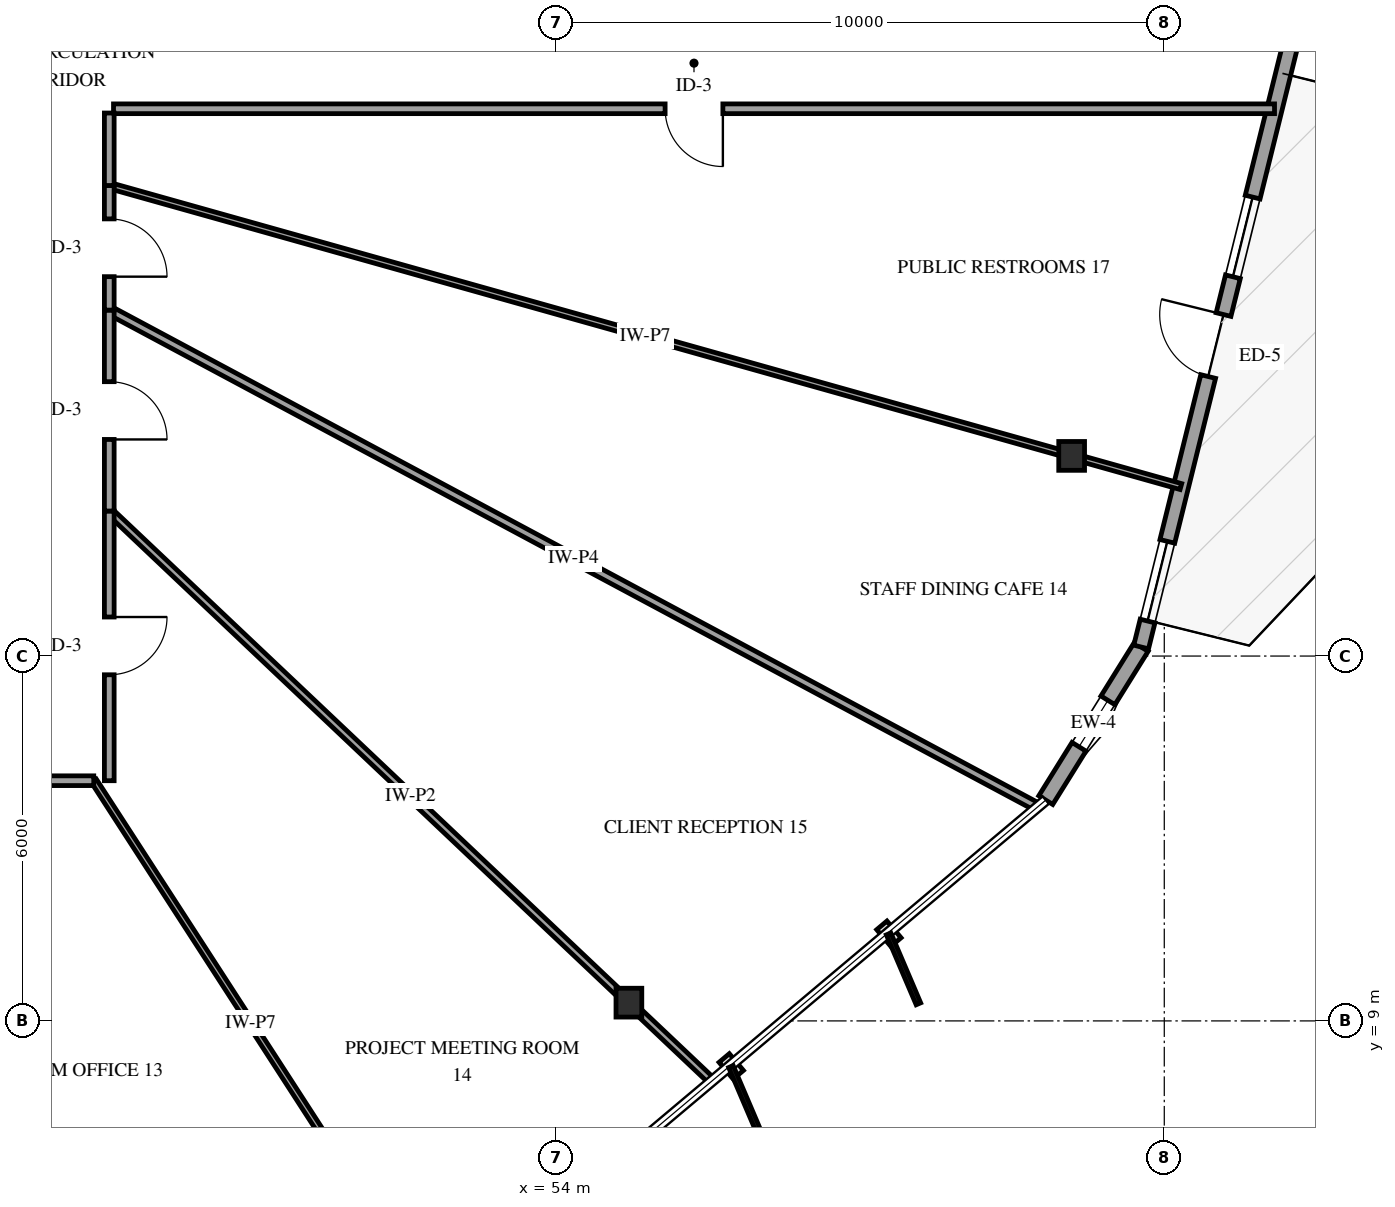
"""IFC4 building model, lengths in metres.
Left out: names, types, materials, properties, quantities, classifications, styles, units other than length and angle.
Written with IfcOpenShell. Run it as: python <this file> out.ifc"""

import sys

from ifc_helpers import new_model, si_unit, direction, frame, frame_2d, origin, origin_2d, place, context, subcontext, project, spatial, rectangle, i_section, extrude, element, fill, save


model = new_model("IFC4")
c1 = context("Model", 3, precision=1e-05, world=origin(), true_north=direction((0.0, 1.0)))
c2 = subcontext(c1, "Body", "Model", "MODEL_VIEW")
j1 = project(units=[si_unit("LENGTHUNIT", "METRE"), si_unit("PLANEANGLEUNIT", "RADIAN")], contexts=[c1])
p1 = place(None, origin())
s1 = spatial("IfcSite", under=j1, at=p1, CompositionType="ELEMENT")
p2 = place(p1, origin())
s2 = spatial("IfcBuilding", under=s1, at=p2, CompositionType="ELEMENT")
p3 = place(p2, frame((0.0, 0.0, 42.6)))
s3 = spatial("IfcBuildingStorey", under=s2, at=p3, CompositionType="ELEMENT", Elevation=42.6)
for number, where, z_axis, x_axis in (
    (1, (55.196, 9.3, 0.0), (0.0, 0.0, 1.0), (1.0, 0.0, 0.0)),
    (2, (62.477, 18.292, 0.0), (0.0, 0.0, 1.0), (1.0, 0.0, 0.0)),
):
    element("IfcColumn", number, at=place(p3, frame(where, z_axis=z_axis, x_axis=x_axis)), inside=s3, PredefinedType="COLUMN", context=c2, shape_type="SweptSolid", body=[
        extrude(i_section(OverallWidth=0.424, OverallDepth=0.474, WebThickness=0.048, FlangeThickness=0.077, FilletRadius=0.038, at=origin_2d()), origin(), (0.0, 0.0, 1.0), 4.0),
    ])
p4 = place(p3, frame((62.051, 12.631, 0.0), z_axis=(0.0, 0.0, 1.0), x_axis=(0.528777761123, 0.848760319137, 0.0)))
e3 = element("IfcWall", 3, at=p4, inside=s3, PredefinedType="SOLIDWALL", context=c2, shape_type="SweptSolid", body=[
    extrude(rectangle(XDim=2.967, YDim=0.27, at=frame_2d((1.483, 0.0))), origin(), (0.0, 0.0, 1.0), 3.079),
])
p5 = place(p4, frame((1.033, 0.0, 0.75)))
e4 = element("IfcOpeningElement", 4, at=p5, cuts=e3, PredefinedType="OPENING", context=c2, shape_type="SweptSolid", body=[
    extrude(rectangle(XDim=0.9, YDim=1.5, at=frame_2d((0.45, 0.75))), frame((0.0, 0.145, 0.0), z_axis=(0.0, -1.0, 0.0), x_axis=(1.0, 0.0, 0.0)), (0.0, 0.0, 1.0), 0.29),
])
p6 = place(p3, frame((63.62, 15.149, 0.0), z_axis=(0.0, 0.0, 1.0), x_axis=(0.2405572261, 0.970634957629, 0.0)))
e5 = element("IfcWall", 5, at=p6, inside=s3, PredefinedType="SOLIDWALL", context=c2, shape_type="SweptSolid", body=[
    extrude(rectangle(XDim=10.165, YDim=0.25, at=frame_2d((5.083, 0.0))), origin(), (0.0, 0.0, 1.0), 3.079),
])
p7 = place(p6, frame((4.583, 0.0, 0.0)))
e6 = element("IfcOpeningElement", 6, at=p7, cuts=e5, PredefinedType="OPENING", context=c2, shape_type="SweptSolid", body=[
    extrude(rectangle(XDim=1.05, YDim=2.15, at=frame_2d((0.525, 1.075))), frame((0.0, 0.135, 0.0), z_axis=(0.0, -1.0, 0.0), x_axis=(1.0, 0.0, 0.0)), (0.0, 0.0, 1.0), 0.27),
])
p8 = place(p6, frame((0.44, 0.0, 0.72)))
e7 = element("IfcOpeningElement", 7, at=p8, cuts=e5, PredefinedType="OPENING", context=c2, shape_type="SweptSolid", body=[
    extrude(rectangle(XDim=1.35, YDim=1.65, at=frame_2d((0.675, 0.825))), frame((0.0, 0.135, 0.0), z_axis=(0.0, -1.0, 0.0), x_axis=(1.0, 0.0, 0.0)), (0.0, 0.0, 1.0), 0.27),
])
p9 = place(p6, frame((6.273, 0.0, 0.72)))
e8 = element("IfcOpeningElement", 8, at=p9, cuts=e5, PredefinedType="OPENING", context=c2, shape_type="SweptSolid", body=[
    extrude(rectangle(XDim=1.35, YDim=1.65, at=frame_2d((0.675, 0.825))), frame((0.0, 0.135, 0.0), z_axis=(0.0, -1.0, 0.0), x_axis=(1.0, 0.0, 0.0)), (0.0, 0.0, 1.0), 0.27),
])
p10 = place(p3, frame((65.813, 24.0, 0.0), z_axis=(0.0, 0.0, 1.0), x_axis=(-1.0, 0.0, 0.0)))
e9 = element("IfcWall", 9, at=p10, inside=s3, PredefinedType="PARTITIONING", context=c2, shape_type="SweptSolid", body=[
    extrude(rectangle(XDim=19.093, YDim=0.16, at=frame_2d((9.546, 0.0))), origin(), (0.0, 0.0, 1.0), 3.7),
])
p11 = place(p10, frame((9.072, 0.0, 0.0)))
e10 = element("IfcOpeningElement", 10, at=p11, cuts=e9, PredefinedType="OPENING", context=c2, shape_type="SweptSolid", body=[
    extrude(rectangle(XDim=0.95, YDim=2.15, at=frame_2d((0.475, 1.075))), frame((0.0, 0.09, 0.0), z_axis=(0.0, -1.0, 0.0), x_axis=(1.0, 0.0, 0.0)), (0.0, 0.0, 1.0), 0.18),
])
p12 = place(p3, frame((46.65, 22.738, 0.0), z_axis=(0.0, 0.0, 1.0), x_axis=(0.962729980638, -0.270464386531, 0.0)))
e11 = element("IfcWall", 11, at=p12, inside=s3, PredefinedType="PARTITIONING", context=c2, shape_type="SweptSolid", body=[
    extrude(rectangle(XDim=18.305, YDim=0.1, at=frame_2d((9.153, 0.0))), origin(), (0.0, 0.0, 1.0), 2.995),
])
p13 = place(p3, frame((46.65, 20.689, 0.0), z_axis=(0.0, 0.0, 1.0), x_axis=(0.881597742857, -0.472001504012, 0.0)))
e12 = element("IfcWall", 12, at=p13, inside=s3, PredefinedType="PARTITIONING", context=c2, shape_type="SweptSolid", body=[
    extrude(rectangle(XDim=17.315, YDim=0.14, at=frame_2d((8.658, 0.0))), origin(), (0.0, 0.0, 1.0), 3.078),
])
p14 = place(p3, frame((46.65, 17.385, 0.0), z_axis=(0.0, 0.0, 1.0), x_axis=(0.726449099084, -0.68722027505, 0.0)))
e13 = element("IfcWall", 13, at=p14, inside=s3, PredefinedType="PARTITIONING", context=c2, shape_type="SweptSolid", body=[
    extrude(rectangle(XDim=13.642, YDim=0.12, at=frame_2d((6.821, 0.0))), origin(), (0.0, 0.0, 1.0), 2.995),
])
p15 = place(p3, frame((46.395, 12.95, 0.0), z_axis=(0.0, 0.0, 1.0), x_axis=(0.543178785991, -0.839617059408, 0.0)))
e14 = element("IfcWall", 14, at=p15, inside=s3, PredefinedType="PARTITIONING", context=c2, shape_type="SweptSolid", body=[
    extrude(rectangle(XDim=9.496, YDim=0.1, at=frame_2d((4.748, 0.0))), origin(), (0.0, 0.0, 1.0), 3.078),
])
p16 = place(p3, frame((46.65, 17.385, 0.0), z_axis=(0.0, 0.0, 1.0), x_axis=(0.0, -1.0, 0.0)))
e15 = element("IfcWall", 15, at=p16, inside=s3, PredefinedType="PARTITIONING", context=c2, shape_type="SweptSolid", body=[
    extrude(rectangle(XDim=4.435, YDim=0.16, at=frame_2d((2.218, 0.0))), origin(), (0.0, 0.0, 1.0), 3.7),
])
p17 = place(p16, frame((1.743, 0.0, 0.0)))
e16 = element("IfcOpeningElement", 16, at=p17, cuts=e15, PredefinedType="OPENING", context=c2, shape_type="SweptSolid", body=[
    extrude(rectangle(XDim=0.95, YDim=2.15, at=frame_2d((0.475, 1.075))), frame((0.0, 0.09, 0.0), z_axis=(0.0, -1.0, 0.0), x_axis=(1.0, 0.0, 0.0)), (0.0, 0.0, 1.0), 0.18),
])
p18 = place(p3, frame((46.395, 12.95, 0.0), z_axis=(0.0, 0.0, 1.0), x_axis=(-1.0, 0.0, 0.0)))
e17 = element("IfcWall", 17, at=p18, inside=s3, PredefinedType="PARTITIONING", context=c2, shape_type="SweptSolid", body=[
    extrude(rectangle(XDim=4.301, YDim=0.16, at=frame_2d((2.15, 0.0))), origin(), (0.0, 0.0, 1.0), 3.7),
])
p19 = place(p18, frame((1.676, 0.0, 0.0)))
e18 = element("IfcOpeningElement", 18, at=p19, cuts=e17, PredefinedType="OPENING", context=c2, shape_type="SweptSolid", body=[
    extrude(rectangle(XDim=0.95, YDim=2.15, at=frame_2d((0.475, 1.075))), frame((0.0, 0.09, 0.0), z_axis=(0.0, -1.0, 0.0), x_axis=(1.0, 0.0, 0.0)), (0.0, 0.0, 1.0), 0.18),
])
p20 = place(p3, frame((46.65, 20.689, 0.0), z_axis=(0.0, 0.0, 1.0), x_axis=(0.0, -1.0, 0.0)))
e19 = element("IfcWall", 19, at=p20, inside=s3, PredefinedType="PARTITIONING", context=c2, shape_type="SweptSolid", body=[
    extrude(rectangle(XDim=3.304, YDim=0.16, at=frame_2d((1.652, 0.0))), origin(), (0.0, 0.0, 1.0), 3.7),
])
p21 = place(p20, frame((1.177, 0.0, 0.0)))
e20 = element("IfcOpeningElement", 20, at=p21, cuts=e19, PredefinedType="OPENING", context=c2, shape_type="SweptSolid", body=[
    extrude(rectangle(XDim=0.95, YDim=2.15, at=frame_2d((0.475, 1.075))), frame((0.0, 0.09, 0.0), z_axis=(0.0, -1.0, 0.0), x_axis=(1.0, 0.0, 0.0)), (0.0, 0.0, 1.0), 0.18),
])
p22 = place(p3, frame((46.65, 22.738, 0.0), z_axis=(0.0, 0.0, 1.0), x_axis=(0.0, -1.0, 0.0)))
e21 = element("IfcWall", 21, at=p22, inside=s3, PredefinedType="PARTITIONING", context=c2, shape_type="SweptSolid", body=[
    extrude(rectangle(XDim=2.049, YDim=0.16, at=frame_2d((1.024, 0.0))), origin(), (0.0, 0.0, 1.0), 3.7),
])
p23 = place(p22, frame((0.549, 0.0, 0.0)))
e22 = element("IfcOpeningElement", 22, at=p23, cuts=e21, PredefinedType="OPENING", context=c2, shape_type="SweptSolid", body=[
    extrude(rectangle(XDim=0.95, YDim=2.15, at=frame_2d((0.475, 1.075))), frame((0.0, 0.09, 0.0), z_axis=(0.0, -1.0, 0.0), x_axis=(1.0, 0.0, 0.0)), (0.0, 0.0, 1.0), 0.18),
])
p24 = place(p3, frame((46.65, 23.93, 0.0), z_axis=(0.0, 0.0, 1.0), x_axis=(0.0, -1.0, 0.0)))
e23 = element("IfcWall", 23, at=p24, inside=s3, PredefinedType="PARTITIONING", context=c2, shape_type="SweptSolid", body=[
    extrude(rectangle(XDim=1.192, YDim=0.16, at=frame_2d((0.596, 0.0))), origin(), (0.0, 0.0, 1.0), 3.7),
])
p25 = place(p5, origin())
e24 = element("IfcWindow", 24, at=p25, inside=s3, PartitioningType="SINGLE_PANEL", PredefinedType="WINDOW", context=c2, shape_type="SweptSolid", body=[
    extrude(rectangle(XDim=0.9, YDim=1.5, at=frame_2d((0.45, 0.75))), frame((0.0, 0.03, 0.0), z_axis=(0.0, -1.0, 0.0), x_axis=(1.0, 0.0, 0.0)), (0.0, 0.0, 1.0), 0.06),
])
fill(e4, e24)
p26 = place(p7, origin())
e25 = element("IfcDoor", 25, at=p26, inside=s3, OperationType="SINGLE_SWING_RIGHT", PredefinedType="DOOR", context=c2, shape_type="SweptSolid", body=[
    extrude(rectangle(XDim=1.05, YDim=2.15, at=frame_2d((0.525, 1.075))), frame((0.0, 0.025, 0.0), z_axis=(0.0, -1.0, 0.0), x_axis=(1.0, 0.0, 0.0)), (0.0, 0.0, 1.0), 0.05),
])
fill(e6, e25)
p27 = place(p8, origin())
e26 = element("IfcWindow", 26, at=p27, inside=s3, PartitioningType="SINGLE_PANEL", PredefinedType="WINDOW", context=c2, shape_type="SweptSolid", body=[
    extrude(rectangle(XDim=1.35, YDim=1.65, at=frame_2d((0.675, 0.825))), frame((0.0, 0.03, 0.0), z_axis=(0.0, -1.0, 0.0), x_axis=(1.0, 0.0, 0.0)), (0.0, 0.0, 1.0), 0.06),
])
fill(e7, e26)
p28 = place(p9, origin())
e27 = element("IfcWindow", 27, at=p28, inside=s3, PartitioningType="SINGLE_PANEL", PredefinedType="WINDOW", context=c2, shape_type="SweptSolid", body=[
    extrude(rectangle(XDim=1.35, YDim=1.65, at=frame_2d((0.675, 0.825))), frame((0.0, 0.03, 0.0), z_axis=(0.0, -1.0, 0.0), x_axis=(1.0, 0.0, 0.0)), (0.0, 0.0, 1.0), 0.06),
])
fill(e8, e27)
p29 = place(p11, origin())
e28 = element("IfcDoor", 28, at=p29, inside=s3, OperationType="SINGLE_SWING_LEFT", PredefinedType="DOOR", context=c2, shape_type="SweptSolid", body=[
    extrude(rectangle(XDim=0.95, YDim=2.15, at=frame_2d((0.475, 1.075))), frame((0.0, 0.025, 0.0), z_axis=(0.0, -1.0, 0.0), x_axis=(1.0, 0.0, 0.0)), (0.0, 0.0, 1.0), 0.05),
])
fill(e10, e28)
p30 = place(p17, origin())
e29 = element("IfcDoor", 29, at=p30, inside=s3, OperationType="SINGLE_SWING_LEFT", PredefinedType="DOOR", context=c2, shape_type="SweptSolid", body=[
    extrude(rectangle(XDim=0.95, YDim=2.15, at=frame_2d((0.475, 1.075))), frame((0.0, 0.025, 0.0), z_axis=(0.0, -1.0, 0.0), x_axis=(1.0, 0.0, 0.0)), (0.0, 0.0, 1.0), 0.05),
])
fill(e16, e29)
p31 = place(p21, origin())
e30 = element("IfcDoor", 30, at=p31, inside=s3, OperationType="SINGLE_SWING_RIGHT", PredefinedType="DOOR", context=c2, shape_type="SweptSolid", body=[
    extrude(rectangle(XDim=0.95, YDim=2.15, at=frame_2d((0.475, 1.075))), frame((0.0, 0.025, 0.0), z_axis=(0.0, -1.0, 0.0), x_axis=(1.0, 0.0, 0.0)), (0.0, 0.0, 1.0), 0.05),
])
fill(e20, e30)
p32 = place(p23, origin())
e31 = element("IfcDoor", 31, at=p32, inside=s3, OperationType="SINGLE_SWING_RIGHT", PredefinedType="DOOR", context=c2, shape_type="SweptSolid", body=[
    extrude(rectangle(XDim=0.95, YDim=2.15, at=frame_2d((0.475, 1.075))), frame((0.0, 0.025, 0.0), z_axis=(0.0, -1.0, 0.0), x_axis=(1.0, 0.0, 0.0)), (0.0, 0.0, 1.0), 0.05),
])
fill(e22, e31)
save(model, sys.argv[1])
